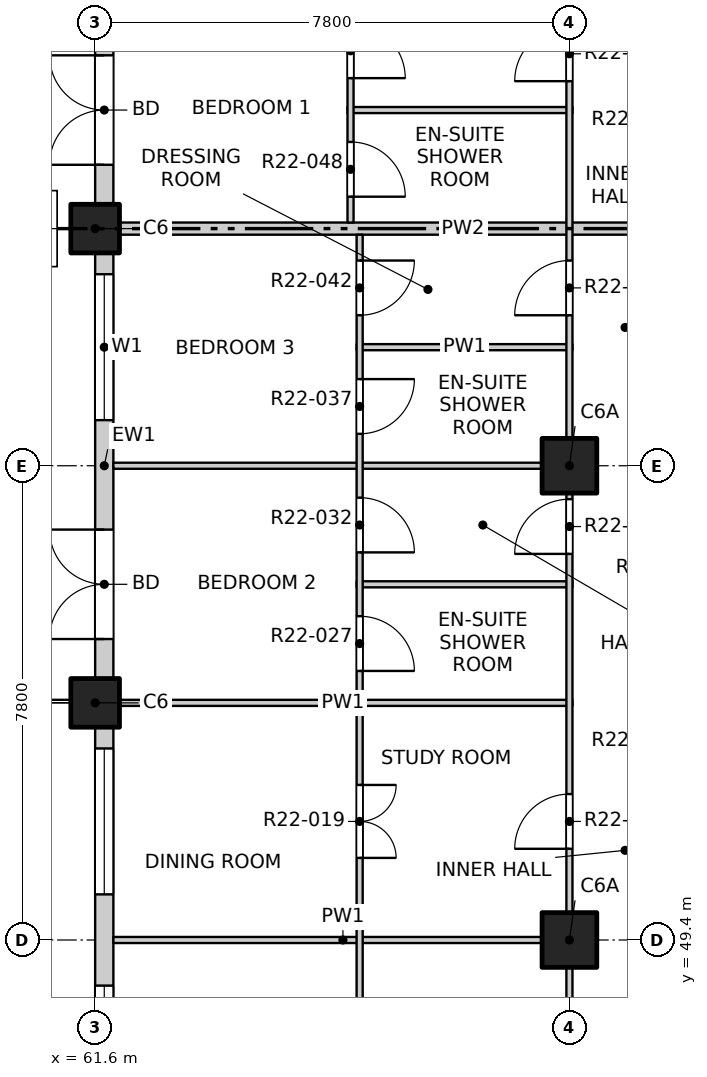
"""IFC4 building model, lengths in metres.
Left out: names, types, materials, properties, quantities, classifications, styles, units other than length and angle.
Written with IfcOpenShell. Run it as: python <this file> out.ifc"""

import sys

from ifc_helpers import new_model, si_unit, direction, frame, frame_2d, origin, origin_2d, place, context, subcontext, project, spatial, rectangle, extrude, element, fill, save


model = new_model("IFC4")
c1 = context("Model", 3, precision=1e-05, world=origin(), true_north=direction((0.0, 1.0)))
c2 = subcontext(c1, "Body", "Model", "MODEL_VIEW")
j1 = project(units=[si_unit("LENGTHUNIT", "METRE"), si_unit("PLANEANGLEUNIT", "RADIAN")], contexts=[c1])
p1 = place(None, origin())
s1 = spatial("IfcSite", under=j1, at=p1, CompositionType="ELEMENT")
p2 = place(p1, origin())
s2 = spatial("IfcBuilding", under=s1, at=p2, CompositionType="ELEMENT")
p3 = place(p2, frame((0.0, 0.0, 224.5)))
s3 = spatial("IfcBuildingStorey", under=s2, at=p3, CompositionType="ELEMENT", Elevation=224.5)
for number, where, z_axis, x_axis in (
    (1, (61.6, 53.3, -0.25), (0.0, 0.0, 1.0), (1.0, 0.0, 0.0)),
    (2, (61.6, 61.1, -0.25), (0.0, 0.0, 1.0), (1.0, 0.0, 0.0)),
):
    element("IfcColumn", number, at=place(p3, frame(where, z_axis=z_axis, x_axis=x_axis)), inside=s3, PredefinedType="COLUMN", context=c2, shape_type="SweptSolid", body=[
        extrude(rectangle(XDim=0.8, YDim=0.8, at=origin_2d()), origin(), (0.0, 0.0, 1.0), 3.4),
    ])
for number, where, z_axis, x_axis in (
    (3, (69.4, 49.4, -0.25), (0.0, 0.0, 1.0), (1.0, 0.0, 0.0)),
    (4, (69.4, 57.2, -0.25), (0.0, 0.0, 1.0), (1.0, 0.0, 0.0)),
):
    element("IfcColumn", number, at=place(p3, frame(where, z_axis=z_axis, x_axis=x_axis)), inside=s3, PredefinedType="COLUMN", context=c2, shape_type="SweptSolid", body=[
        extrude(rectangle(XDim=0.9, YDim=0.9, at=origin_2d()), origin(), (0.0, 0.0, 1.0), 3.4),
    ])
p4 = place(p3, frame((61.75, 45.5, 0.0), z_axis=(0.0, 0.0, 1.0), x_axis=(0.0, 1.0, 0.0)))
e5 = element("IfcWall", 5, at=p4, inside=s3, PredefinedType="SOLIDWALL", context=c2, shape_type="SweptSolid", body=[
    extrude(rectangle(XDim=7.4, YDim=0.3, at=frame_2d((3.7, 0.0))), origin(), (0.0, 0.0, 1.0), 2.7),
])
p5 = place(p4, frame((0.75, 0.0, 0.9)))
e6 = element("IfcOpeningElement", 6, at=p5, cuts=e5, PredefinedType="OPENING", context=c2, shape_type="SweptSolid", body=[
    extrude(rectangle(XDim=2.4, YDim=1.8, at=frame_2d((1.2, 0.9))), frame((0.0, 0.16, 0.0), z_axis=(0.0, -1.0, 0.0), x_axis=(1.0, 0.0, 0.0)), (0.0, 0.0, 1.0), 0.32),
])
p6 = place(p4, frame((4.65, 0.0, 0.9)))
e7 = element("IfcOpeningElement", 7, at=p6, cuts=e5, PredefinedType="OPENING", context=c2, shape_type="SweptSolid", body=[
    extrude(rectangle(XDim=2.4, YDim=1.8, at=frame_2d((1.2, 0.9))), frame((0.0, 0.16, 0.0), z_axis=(0.0, -1.0, 0.0), x_axis=(1.0, 0.0, 0.0)), (0.0, 0.0, 1.0), 0.32),
])
p7 = place(p3, frame((61.75, 53.7, 0.0), z_axis=(0.0, 0.0, 1.0), x_axis=(0.0, 1.0, 0.0)))
e8 = element("IfcWall", 8, at=p7, inside=s3, PredefinedType="SOLIDWALL", context=c2, shape_type="SweptSolid", body=[
    extrude(rectangle(XDim=7.0, YDim=0.3, at=frame_2d((3.5, 0.0))), origin(), (0.0, 0.0, 1.0), 2.7),
])
p8 = place(p7, frame((0.65, 0.0, 0.0)))
e9 = element("IfcOpeningElement", 9, at=p8, cuts=e8, PredefinedType="OPENING", context=c2, shape_type="SweptSolid", body=[
    extrude(rectangle(XDim=1.8, YDim=2.4, at=frame_2d((0.9, 1.2))), frame((0.0, 0.16, 0.0), z_axis=(0.0, -1.0, 0.0), x_axis=(1.0, 0.0, 0.0)), (0.0, 0.0, 1.0), 0.32),
])
p9 = place(p7, frame((4.25, 0.0, 0.9)))
e10 = element("IfcOpeningElement", 10, at=p9, cuts=e8, PredefinedType="OPENING", context=c2, shape_type="SweptSolid", body=[
    extrude(rectangle(XDim=2.4, YDim=1.8, at=frame_2d((1.2, 0.9))), frame((0.0, 0.16, 0.0), z_axis=(0.0, -1.0, 0.0), x_axis=(1.0, 0.0, 0.0)), (0.0, 0.0, 1.0), 0.32),
])
p10 = place(p3, frame((61.75, 61.5, 0.0), z_axis=(0.0, 0.0, 1.0), x_axis=(0.0, 1.0, 0.0)))
e11 = element("IfcWall", 11, at=p10, inside=s3, PredefinedType="SOLIDWALL", context=c2, shape_type="SweptSolid", body=[
    extrude(rectangle(XDim=7.0, YDim=0.3, at=frame_2d((3.5, 0.0))), origin(), (0.0, 0.0, 1.0), 2.7),
])
p11 = place(p10, frame((0.65, 0.0, 0.0)))
e12 = element("IfcOpeningElement", 12, at=p11, cuts=e11, PredefinedType="OPENING", context=c2, shape_type="SweptSolid", body=[
    extrude(rectangle(XDim=1.8, YDim=2.4, at=frame_2d((0.9, 1.2))), frame((0.0, 0.16, 0.0), z_axis=(0.0, -1.0, 0.0), x_axis=(1.0, 0.0, 0.0)), (0.0, 0.0, 1.0), 0.32),
])
p12 = place(p10, frame((4.25, 0.0, 0.9)))
e13 = element("IfcOpeningElement", 13, at=p12, cuts=e11, PredefinedType="OPENING", context=c2, shape_type="SweptSolid", body=[
    extrude(rectangle(XDim=2.4, YDim=1.8, at=frame_2d((1.2, 0.9))), frame((0.0, 0.16, 0.0), z_axis=(0.0, -1.0, 0.0), x_axis=(1.0, 0.0, 0.0)), (0.0, 0.0, 1.0), 0.32),
])
for number, where, z_axis, x_axis in (
    (14, (61.9, 49.4, 0.0), (0.0, 0.0, 1.0), (1.0, 0.0, 0.0)),
    (15, (61.9, 53.3, 0.0), (0.0, 0.0, 1.0), (1.0, 0.0, 0.0)),
):
    element("IfcWall", number, at=place(p3, frame(where, z_axis=z_axis, x_axis=x_axis)), inside=s3, PredefinedType="PARTITIONING", context=c2, shape_type="SweptSolid", body=[
        extrude(rectangle(XDim=7.55, YDim=0.1, at=frame_2d((3.775, 0.0))), origin(), (0.0, 0.0, 1.0), 3.15),
    ])
p13 = place(p3, frame((65.9, 55.25, 0.0), z_axis=(0.0, 0.0, 1.0), x_axis=(1.0, 0.0, 0.0)))
e16 = element("IfcWall", 16, at=p13, inside=s3, PredefinedType="PARTITIONING", context=c2, shape_type="SweptSolid", body=[
    extrude(rectangle(XDim=3.55, YDim=0.1, at=frame_2d((1.775, 0.0))), origin(), (0.0, 0.0, 1.0), 3.15),
])
p14 = place(p3, frame((61.9, 57.2, 0.0), z_axis=(0.0, 0.0, 1.0), x_axis=(1.0, 0.0, 0.0)))
e17 = element("IfcWall", 17, at=p14, inside=s3, PredefinedType="PARTITIONING", context=c2, shape_type="SweptSolid", body=[
    extrude(rectangle(XDim=7.55, YDim=0.1, at=frame_2d((3.775, 0.0))), origin(), (0.0, 0.0, 1.0), 3.15),
])
p15 = place(p3, frame((65.9, 59.15, 0.0), z_axis=(0.0, 0.0, 1.0), x_axis=(1.0, 0.0, 0.0)))
e18 = element("IfcWall", 18, at=p15, inside=s3, PredefinedType="PARTITIONING", context=c2, shape_type="SweptSolid", body=[
    extrude(rectangle(XDim=3.55, YDim=0.1, at=frame_2d((1.775, 0.0))), origin(), (0.0, 0.0, 1.0), 3.15),
])
p16 = place(p3, frame((61.9, 61.1, 0.0), z_axis=(0.0, 0.0, 1.0), x_axis=(1.0, 0.0, 0.0)))
e19 = element("IfcWall", 19, at=p16, inside=s3, PredefinedType="PARTITIONING", context=c2, shape_type="SweptSolid", body=[
    extrude(rectangle(XDim=11.5, YDim=0.2, at=frame_2d((5.75, 0.0))), origin(), (0.0, 0.0, 1.0), 2.55),
])
p17 = place(p3, frame((65.75, 63.05, 0.0), z_axis=(0.0, 0.0, 1.0), x_axis=(1.0, 0.0, 0.0)))
e20 = element("IfcWall", 20, at=p17, inside=s3, PredefinedType="PARTITIONING", context=c2, shape_type="SweptSolid", body=[
    extrude(rectangle(XDim=3.7, YDim=0.1, at=frame_2d((1.85, 0.0))), origin(), (0.0, 0.0, 1.0), 3.15),
])
p18 = place(p3, frame((65.8, 61.2, 0.0), z_axis=(0.0, 0.0, 1.0), x_axis=(0.0, 1.0, 0.0)))
e21 = element("IfcWall", 21, at=p18, inside=s3, PredefinedType="PARTITIONING", context=c2, shape_type="SweptSolid", body=[
    extrude(rectangle(XDim=11.5, YDim=0.1, at=frame_2d((5.75, 0.0))), origin(), (0.0, 0.0, 1.0), 3.15),
])
p19 = place(p18, frame((0.425, 0.0, 0.0)))
e22 = element("IfcOpeningElement", 22, at=p19, cuts=e21, PredefinedType="OPENING", context=c2, shape_type="SweptSolid", body=[
    extrude(rectangle(XDim=0.9, YDim=2.1, at=frame_2d((0.45, 1.05))), frame((0.0, 0.06, 0.0), z_axis=(0.0, -1.0, 0.0), x_axis=(1.0, 0.0, 0.0)), (0.0, 0.0, 1.0), 0.12),
])
p20 = place(p18, frame((2.375, 0.0, 0.0)))
e23 = element("IfcOpeningElement", 23, at=p20, cuts=e21, PredefinedType="OPENING", context=c2, shape_type="SweptSolid", body=[
    extrude(rectangle(XDim=0.9, YDim=2.1, at=frame_2d((0.45, 1.05))), frame((0.0, 0.06, 0.0), z_axis=(0.0, -1.0, 0.0), x_axis=(1.0, 0.0, 0.0)), (0.0, 0.0, 1.0), 0.12),
])
p21 = place(p18, frame((5.15, 0.0, 0.0)))
e24 = element("IfcOpeningElement", 24, at=p21, cuts=e21, PredefinedType="OPENING", context=c2, shape_type="SweptSolid", body=[
    extrude(rectangle(XDim=1.2, YDim=2.1, at=frame_2d((0.6, 1.05))), frame((0.0, 0.06, 0.0), z_axis=(0.0, -1.0, 0.0), x_axis=(1.0, 0.0, 0.0)), (0.0, 0.0, 1.0), 0.12),
])
p22 = place(p18, frame((8.225, 0.0, 0.0)))
e25 = element("IfcOpeningElement", 25, at=p22, cuts=e21, PredefinedType="OPENING", context=c2, shape_type="SweptSolid", body=[
    extrude(rectangle(XDim=0.9, YDim=2.1, at=frame_2d((0.45, 1.05))), frame((0.0, 0.06, 0.0), z_axis=(0.0, -1.0, 0.0), x_axis=(1.0, 0.0, 0.0)), (0.0, 0.0, 1.0), 0.12),
])
p23 = place(p18, frame((10.175, 0.0, 0.0)))
e26 = element("IfcOpeningElement", 26, at=p23, cuts=e21, PredefinedType="OPENING", context=c2, shape_type="SweptSolid", body=[
    extrude(rectangle(XDim=0.9, YDim=2.1, at=frame_2d((0.45, 1.05))), frame((0.0, 0.06, 0.0), z_axis=(0.0, -1.0, 0.0), x_axis=(1.0, 0.0, 0.0)), (0.0, 0.0, 1.0), 0.12),
])
p24 = place(p3, frame((65.95, 41.9, 0.0), z_axis=(0.0, 0.0, 1.0), x_axis=(0.0, 1.0, 0.0)))
e27 = element("IfcWall", 27, at=p24, inside=s3, PredefinedType="PARTITIONING", context=c2, shape_type="SweptSolid", body=[
    extrude(rectangle(XDim=19.1, YDim=0.1, at=frame_2d((9.55, 0.0))), origin(), (0.0, 0.0, 1.0), 3.15),
])
p25 = place(p24, frame((1.05, 0.0, 0.0)))
e28 = element("IfcOpeningElement", 28, at=p25, cuts=e27, PredefinedType="OPENING", context=c2, shape_type="SweptSolid", body=[
    extrude(rectangle(XDim=1.2, YDim=2.1, at=frame_2d((0.6, 1.05))), frame((0.0, 0.06, 0.0), z_axis=(0.0, -1.0, 0.0), x_axis=(1.0, 0.0, 0.0)), (0.0, 0.0, 1.0), 0.12),
])
p26 = place(p24, frame((4.95, 0.0, 0.0)))
e29 = element("IfcOpeningElement", 29, at=p26, cuts=e27, PredefinedType="OPENING", context=c2, shape_type="SweptSolid", body=[
    extrude(rectangle(XDim=1.2, YDim=2.1, at=frame_2d((0.6, 1.05))), frame((0.0, 0.06, 0.0), z_axis=(0.0, -1.0, 0.0), x_axis=(1.0, 0.0, 0.0)), (0.0, 0.0, 1.0), 0.12),
])
p27 = place(p24, frame((8.85, 0.0, 0.0)))
e30 = element("IfcOpeningElement", 30, at=p27, cuts=e27, PredefinedType="OPENING", context=c2, shape_type="SweptSolid", body=[
    extrude(rectangle(XDim=1.2, YDim=2.1, at=frame_2d((0.6, 1.05))), frame((0.0, 0.06, 0.0), z_axis=(0.0, -1.0, 0.0), x_axis=(1.0, 0.0, 0.0)), (0.0, 0.0, 1.0), 0.12),
])
p28 = place(p24, frame((11.925, 0.0, 0.0)))
e31 = element("IfcOpeningElement", 31, at=p28, cuts=e27, PredefinedType="OPENING", context=c2, shape_type="SweptSolid", body=[
    extrude(rectangle(XDim=0.9, YDim=2.1, at=frame_2d((0.45, 1.05))), frame((0.0, 0.06, 0.0), z_axis=(0.0, -1.0, 0.0), x_axis=(1.0, 0.0, 0.0)), (0.0, 0.0, 1.0), 0.12),
])
p29 = place(p24, frame((13.875, 0.0, 0.0)))
e32 = element("IfcOpeningElement", 32, at=p29, cuts=e27, PredefinedType="OPENING", context=c2, shape_type="SweptSolid", body=[
    extrude(rectangle(XDim=0.9, YDim=2.1, at=frame_2d((0.45, 1.05))), frame((0.0, 0.06, 0.0), z_axis=(0.0, -1.0, 0.0), x_axis=(1.0, 0.0, 0.0)), (0.0, 0.0, 1.0), 0.12),
])
p30 = place(p24, frame((15.825, 0.0, 0.0)))
e33 = element("IfcOpeningElement", 33, at=p30, cuts=e27, PredefinedType="OPENING", context=c2, shape_type="SweptSolid", body=[
    extrude(rectangle(XDim=0.9, YDim=2.1, at=frame_2d((0.45, 1.05))), frame((0.0, 0.06, 0.0), z_axis=(0.0, -1.0, 0.0), x_axis=(1.0, 0.0, 0.0)), (0.0, 0.0, 1.0), 0.12),
])
p31 = place(p24, frame((17.775, 0.0, 0.0)))
e34 = element("IfcOpeningElement", 34, at=p31, cuts=e27, PredefinedType="OPENING", context=c2, shape_type="SweptSolid", body=[
    extrude(rectangle(XDim=0.9, YDim=2.1, at=frame_2d((0.45, 1.05))), frame((0.0, 0.06, 0.0), z_axis=(0.0, -1.0, 0.0), x_axis=(1.0, 0.0, 0.0)), (0.0, 0.0, 1.0), 0.12),
])
p32 = place(p3, frame((69.4, 41.9, 0.0), z_axis=(0.0, 0.0, 1.0), x_axis=(0.0, 1.0, 0.0)))
e35 = element("IfcWall", 35, at=p32, inside=s3, PredefinedType="PARTITIONING", context=c2, shape_type="SweptSolid", body=[
    extrude(rectangle(XDim=46.2, YDim=0.1, at=frame_2d((23.1, 0.0))), origin(), (0.0, 0.0, 1.0), 3.15),
])
p33 = place(p32, frame((1.2, 0.0, 0.0)))
e36 = element("IfcOpeningElement", 36, at=p33, cuts=e35, PredefinedType="OPENING", context=c2, shape_type="SweptSolid", body=[
    extrude(rectangle(XDim=0.9, YDim=2.1, at=frame_2d((0.45, 1.05))), frame((0.0, 0.06, 0.0), z_axis=(0.0, -1.0, 0.0), x_axis=(1.0, 0.0, 0.0)), (0.0, 0.0, 1.0), 0.12),
])
p34 = place(p32, frame((5.1, 0.0, 0.0)))
e37 = element("IfcOpeningElement", 37, at=p34, cuts=e35, PredefinedType="OPENING", context=c2, shape_type="SweptSolid", body=[
    extrude(rectangle(XDim=0.9, YDim=2.1, at=frame_2d((0.45, 1.05))), frame((0.0, 0.06, 0.0), z_axis=(0.0, -1.0, 0.0), x_axis=(1.0, 0.0, 0.0)), (0.0, 0.0, 1.0), 0.12),
])
p35 = place(p32, frame((9.0, 0.0, 0.0)))
e38 = element("IfcOpeningElement", 38, at=p35, cuts=e35, PredefinedType="OPENING", context=c2, shape_type="SweptSolid", body=[
    extrude(rectangle(XDim=0.9, YDim=2.1, at=frame_2d((0.45, 1.05))), frame((0.0, 0.06, 0.0), z_axis=(0.0, -1.0, 0.0), x_axis=(1.0, 0.0, 0.0)), (0.0, 0.0, 1.0), 0.12),
])
p36 = place(p32, frame((13.85, 0.0, 0.0)))
e39 = element("IfcOpeningElement", 39, at=p36, cuts=e35, PredefinedType="OPENING", context=c2, shape_type="SweptSolid", body=[
    extrude(rectangle(XDim=0.9, YDim=2.1, at=frame_2d((0.45, 1.05))), frame((0.0, 0.06, 0.0), z_axis=(0.0, -1.0, 0.0), x_axis=(1.0, 0.0, 0.0)), (0.0, 0.0, 1.0), 0.12),
])
p37 = place(p32, frame((17.775, 0.0, 0.0)))
e40 = element("IfcOpeningElement", 40, at=p37, cuts=e35, PredefinedType="OPENING", context=c2, shape_type="SweptSolid", body=[
    extrude(rectangle(XDim=0.9, YDim=2.1, at=frame_2d((0.45, 1.05))), frame((0.0, 0.06, 0.0), z_axis=(0.0, -1.0, 0.0), x_axis=(1.0, 0.0, 0.0)), (0.0, 0.0, 1.0), 0.12),
])
p38 = place(p32, frame((21.625, 0.0, 0.0)))
e41 = element("IfcOpeningElement", 41, at=p38, cuts=e35, PredefinedType="OPENING", context=c2, shape_type="SweptSolid", body=[
    extrude(rectangle(XDim=0.9, YDim=2.1, at=frame_2d((0.45, 1.05))), frame((0.0, 0.06, 0.0), z_axis=(0.0, -1.0, 0.0), x_axis=(1.0, 0.0, 0.0)), (0.0, 0.0, 1.0), 0.12),
])
p39 = place(p32, frame((24.6, 0.0, 0.0)))
e42 = element("IfcOpeningElement", 42, at=p39, cuts=e35, PredefinedType="OPENING", context=c2, shape_type="SweptSolid", body=[
    extrude(rectangle(XDim=0.9, YDim=2.1, at=frame_2d((0.45, 1.05))), frame((0.0, 0.06, 0.0), z_axis=(0.0, -1.0, 0.0), x_axis=(1.0, 0.0, 0.0)), (0.0, 0.0, 1.0), 0.12),
])
p40 = place(p32, frame((29.425, 0.0, 0.0)))
e43 = element("IfcOpeningElement", 43, at=p40, cuts=e35, PredefinedType="OPENING", context=c2, shape_type="SweptSolid", body=[
    extrude(rectangle(XDim=0.9, YDim=2.1, at=frame_2d((0.45, 1.05))), frame((0.0, 0.06, 0.0), z_axis=(0.0, -1.0, 0.0), x_axis=(1.0, 0.0, 0.0)), (0.0, 0.0, 1.0), 0.12),
])
p41 = place(p32, frame((33.375, 0.0, 0.0)))
e44 = element("IfcOpeningElement", 44, at=p41, cuts=e35, PredefinedType="OPENING", context=c2, shape_type="SweptSolid", body=[
    extrude(rectangle(XDim=0.9, YDim=2.1, at=frame_2d((0.45, 1.05))), frame((0.0, 0.06, 0.0), z_axis=(0.0, -1.0, 0.0), x_axis=(1.0, 0.0, 0.0)), (0.0, 0.0, 1.0), 0.12),
])
p42 = place(p32, frame((36.3, 0.0, 0.0)))
e45 = element("IfcOpeningElement", 45, at=p42, cuts=e35, PredefinedType="OPENING", context=c2, shape_type="SweptSolid", body=[
    extrude(rectangle(XDim=0.9, YDim=2.1, at=frame_2d((0.45, 1.05))), frame((0.0, 0.06, 0.0), z_axis=(0.0, -1.0, 0.0), x_axis=(1.0, 0.0, 0.0)), (0.0, 0.0, 1.0), 0.12),
])
p43 = place(p32, frame((41.175, 0.0, 0.0)))
e46 = element("IfcOpeningElement", 46, at=p43, cuts=e35, PredefinedType="OPENING", context=c2, shape_type="SweptSolid", body=[
    extrude(rectangle(XDim=0.9, YDim=2.1, at=frame_2d((0.45, 1.05))), frame((0.0, 0.06, 0.0), z_axis=(0.0, -1.0, 0.0), x_axis=(1.0, 0.0, 0.0)), (0.0, 0.0, 1.0), 0.12),
])
p44 = place(p32, frame((44.1, 0.0, 0.0)))
e47 = element("IfcOpeningElement", 47, at=p44, cuts=e35, PredefinedType="OPENING", context=c2, shape_type="SweptSolid", body=[
    extrude(rectangle(XDim=0.9, YDim=2.1, at=frame_2d((0.45, 1.05))), frame((0.0, 0.06, 0.0), z_axis=(0.0, -1.0, 0.0), x_axis=(1.0, 0.0, 0.0)), (0.0, 0.0, 1.0), 0.12),
])
p45 = place(p5, origin())
e48 = element("IfcWindow", 48, at=p45, inside=s3, PartitioningType="DOUBLE_PANEL_VERTICAL", PredefinedType="WINDOW", context=c2, shape_type="SweptSolid", body=[
    extrude(rectangle(XDim=2.4, YDim=1.8, at=frame_2d((1.2, 0.9))), frame((0.0, 0.03, 0.0), z_axis=(0.0, -1.0, 0.0), x_axis=(1.0, 0.0, 0.0)), (0.0, 0.0, 1.0), 0.06),
])
fill(e6, e48)
p46 = place(p6, origin())
e49 = element("IfcWindow", 49, at=p46, inside=s3, PartitioningType="DOUBLE_PANEL_VERTICAL", PredefinedType="WINDOW", context=c2, shape_type="SweptSolid", body=[
    extrude(rectangle(XDim=2.4, YDim=1.8, at=frame_2d((1.2, 0.9))), frame((0.0, 0.03, 0.0), z_axis=(0.0, -1.0, 0.0), x_axis=(1.0, 0.0, 0.0)), (0.0, 0.0, 1.0), 0.06),
])
fill(e7, e49)
p47 = place(p8, origin())
e50 = element("IfcDoor", 50, at=p47, inside=s3, OperationType="DOUBLE_DOOR_SINGLE_SWING", PredefinedType="DOOR", context=c2, shape_type="SweptSolid", body=[
    extrude(rectangle(XDim=1.8, YDim=2.4, at=frame_2d((0.9, 1.2))), frame((0.0, 0.025, 0.0), z_axis=(0.0, -1.0, 0.0), x_axis=(1.0, 0.0, 0.0)), (0.0, 0.0, 1.0), 0.05),
])
fill(e9, e50)
p48 = place(p9, origin())
e51 = element("IfcWindow", 51, at=p48, inside=s3, PartitioningType="DOUBLE_PANEL_VERTICAL", PredefinedType="WINDOW", context=c2, shape_type="SweptSolid", body=[
    extrude(rectangle(XDim=2.4, YDim=1.8, at=frame_2d((1.2, 0.9))), frame((0.0, 0.03, 0.0), z_axis=(0.0, -1.0, 0.0), x_axis=(1.0, 0.0, 0.0)), (0.0, 0.0, 1.0), 0.06),
])
fill(e10, e51)
p49 = place(p11, origin())
e52 = element("IfcDoor", 52, at=p49, inside=s3, OperationType="DOUBLE_DOOR_SINGLE_SWING", PredefinedType="DOOR", context=c2, shape_type="SweptSolid", body=[
    extrude(rectangle(XDim=1.8, YDim=2.4, at=frame_2d((0.9, 1.2))), frame((0.0, 0.025, 0.0), z_axis=(0.0, -1.0, 0.0), x_axis=(1.0, 0.0, 0.0)), (0.0, 0.0, 1.0), 0.05),
])
fill(e12, e52)
p50 = place(p27, origin())
e53 = element("IfcDoor", 53, at=p50, inside=s3, OperationType="DOUBLE_DOOR_SINGLE_SWING", PredefinedType="DOOR", context=c2, shape_type="SweptSolid", body=[
    extrude(rectangle(XDim=1.2, YDim=2.1, at=frame_2d((0.6, 1.05))), frame((0.0, 0.025, 0.0), z_axis=(0.0, -1.0, 0.0), x_axis=(1.0, 0.0, 0.0)), (0.0, 0.0, 1.0), 0.05),
])
fill(e30, e53)
p51 = place(p35, origin())
e54 = element("IfcDoor", 54, at=p51, inside=s3, OperationType="SINGLE_SWING_LEFT", PredefinedType="DOOR", context=c2, shape_type="SweptSolid", body=[
    extrude(rectangle(XDim=0.9, YDim=2.1, at=frame_2d((0.45, 1.05))), frame((0.0, 0.025, 0.0), z_axis=(0.0, -1.0, 0.0), x_axis=(1.0, 0.0, 0.0)), (0.0, 0.0, 1.0), 0.05),
])
fill(e38, e54)
p52 = place(p28, origin())
e55 = element("IfcDoor", 55, at=p52, inside=s3, OperationType="SINGLE_SWING_RIGHT", PredefinedType="DOOR", context=c2, shape_type="SweptSolid", body=[
    extrude(rectangle(XDim=0.9, YDim=2.1, at=frame_2d((0.45, 1.05))), frame((0.0, 0.025, 0.0), z_axis=(0.0, -1.0, 0.0), x_axis=(1.0, 0.0, 0.0)), (0.0, 0.0, 1.0), 0.05),
])
fill(e31, e55)
p53 = place(p36, origin())
e56 = element("IfcDoor", 56, at=p53, inside=s3, OperationType="SINGLE_SWING_LEFT", PredefinedType="DOOR", context=c2, shape_type="SweptSolid", body=[
    extrude(rectangle(XDim=0.9, YDim=2.1, at=frame_2d((0.45, 1.05))), frame((0.0, 0.025, 0.0), z_axis=(0.0, -1.0, 0.0), x_axis=(1.0, 0.0, 0.0)), (0.0, 0.0, 1.0), 0.05),
])
fill(e39, e56)
p54 = place(p29, origin())
e57 = element("IfcDoor", 57, at=p54, inside=s3, OperationType="SINGLE_SWING_RIGHT", PredefinedType="DOOR", context=c2, shape_type="SweptSolid", body=[
    extrude(rectangle(XDim=0.9, YDim=2.1, at=frame_2d((0.45, 1.05))), frame((0.0, 0.025, 0.0), z_axis=(0.0, -1.0, 0.0), x_axis=(1.0, 0.0, 0.0)), (0.0, 0.0, 1.0), 0.05),
])
fill(e32, e57)
p55 = place(p30, origin())
e58 = element("IfcDoor", 58, at=p55, inside=s3, OperationType="SINGLE_SWING_LEFT", PredefinedType="DOOR", context=c2, shape_type="SweptSolid", body=[
    extrude(rectangle(XDim=0.9, YDim=2.1, at=frame_2d((0.45, 1.05))), frame((0.0, 0.025, 0.0), z_axis=(0.0, -1.0, 0.0), x_axis=(1.0, 0.0, 0.0)), (0.0, 0.0, 1.0), 0.05),
])
fill(e33, e58)
p56 = place(p31, origin())
e59 = element("IfcDoor", 59, at=p56, inside=s3, OperationType="SINGLE_SWING_LEFT", PredefinedType="DOOR", context=c2, shape_type="SweptSolid", body=[
    extrude(rectangle(XDim=0.9, YDim=2.1, at=frame_2d((0.45, 1.05))), frame((0.0, 0.025, 0.0), z_axis=(0.0, -1.0, 0.0), x_axis=(1.0, 0.0, 0.0)), (0.0, 0.0, 1.0), 0.05),
])
fill(e34, e59)
p57 = place(p37, origin())
e60 = element("IfcDoor", 60, at=p57, inside=s3, OperationType="SINGLE_SWING_LEFT", PredefinedType="DOOR", context=c2, shape_type="SweptSolid", body=[
    extrude(rectangle(XDim=0.9, YDim=2.1, at=frame_2d((0.45, 1.05))), frame((0.0, 0.025, 0.0), z_axis=(0.0, -1.0, 0.0), x_axis=(1.0, 0.0, 0.0)), (0.0, 0.0, 1.0), 0.05),
])
fill(e40, e60)
p58 = place(p19, origin())
e61 = element("IfcDoor", 61, at=p58, inside=s3, OperationType="SINGLE_SWING_RIGHT", PredefinedType="DOOR", context=c2, shape_type="SweptSolid", body=[
    extrude(rectangle(XDim=0.9, YDim=2.1, at=frame_2d((0.45, 1.05))), frame((0.0, 0.025, 0.0), z_axis=(0.0, -1.0, 0.0), x_axis=(1.0, 0.0, 0.0)), (0.0, 0.0, 1.0), 0.05),
])
fill(e22, e61)
p59 = place(p38, origin())
e62 = element("IfcDoor", 62, at=p59, inside=s3, OperationType="SINGLE_SWING_LEFT", PredefinedType="DOOR", context=c2, shape_type="SweptSolid", body=[
    extrude(rectangle(XDim=0.9, YDim=2.1, at=frame_2d((0.45, 1.05))), frame((0.0, 0.025, 0.0), z_axis=(0.0, -1.0, 0.0), x_axis=(1.0, 0.0, 0.0)), (0.0, 0.0, 1.0), 0.05),
])
fill(e41, e62)
p60 = place(p20, origin())
e63 = element("IfcDoor", 63, at=p60, inside=s3, OperationType="SINGLE_SWING_RIGHT", PredefinedType="DOOR", context=c2, shape_type="SweptSolid", body=[
    extrude(rectangle(XDim=0.9, YDim=2.1, at=frame_2d((0.45, 1.05))), frame((0.0, 0.025, 0.0), z_axis=(0.0, -1.0, 0.0), x_axis=(1.0, 0.0, 0.0)), (0.0, 0.0, 1.0), 0.05),
])
fill(e23, e63)
save(model, sys.argv[1])
